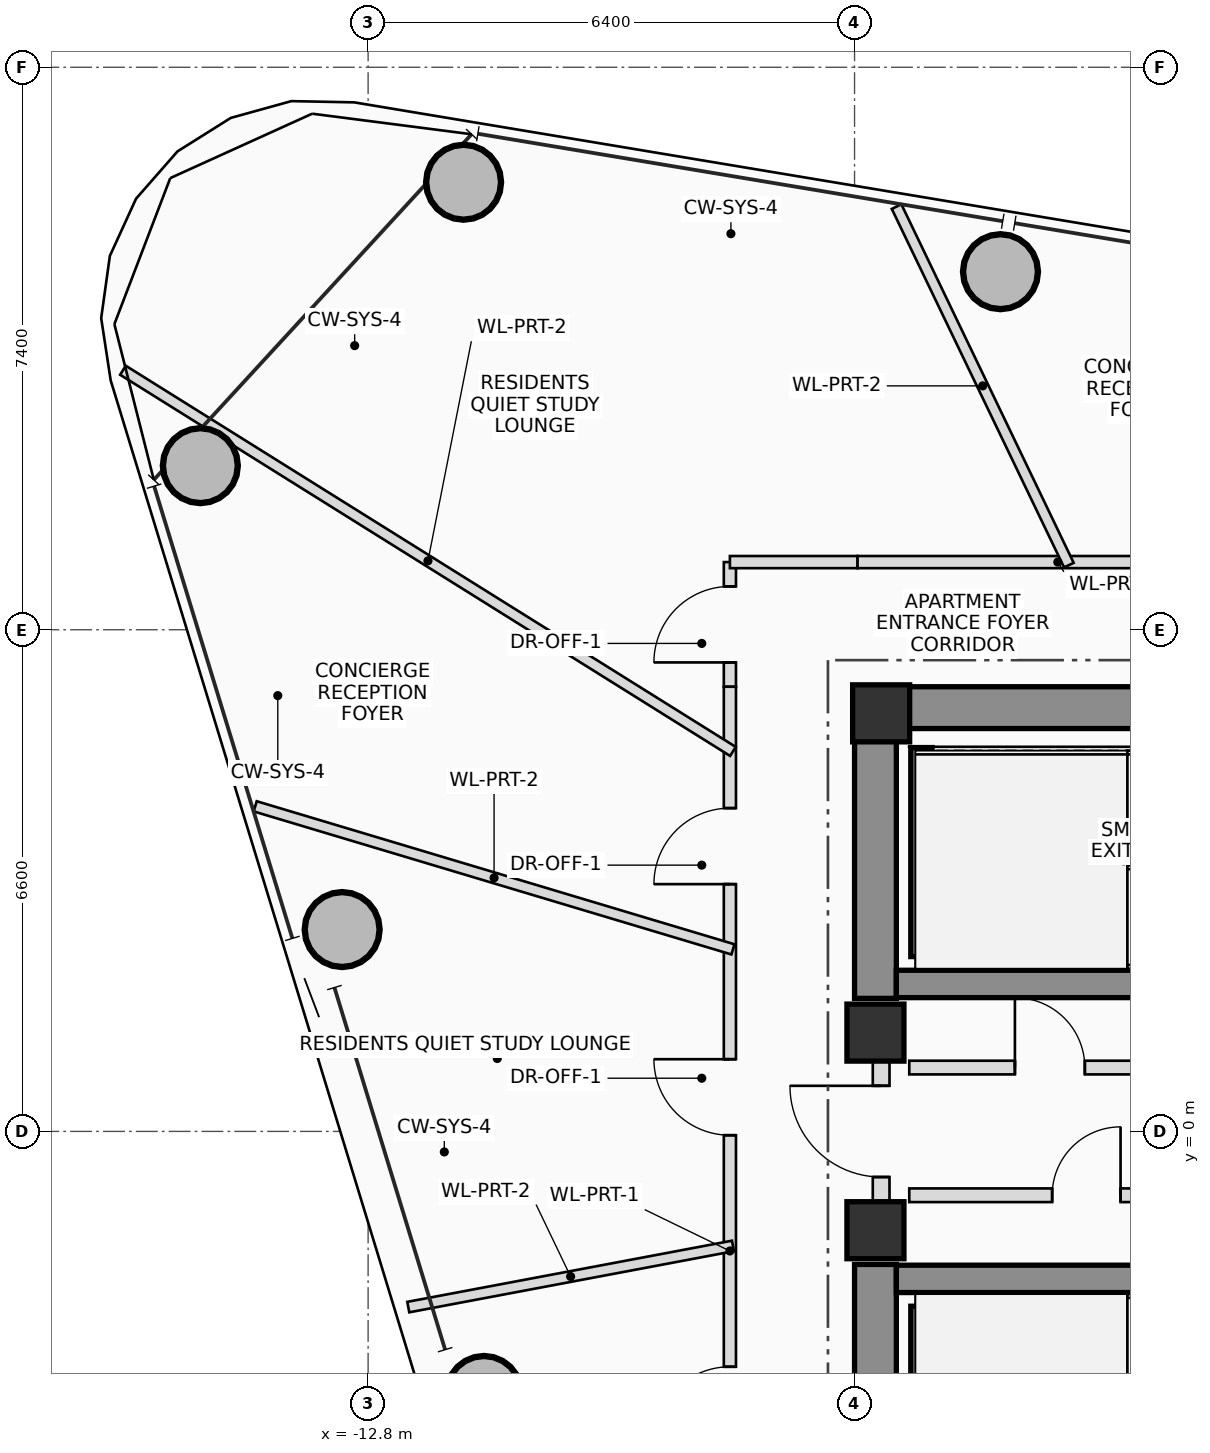
"""IFC4 building model, lengths in metres.
Left out: names, types, materials, properties, quantities, classifications, styles, units other than length and angle.
Written with IfcOpenShell. Run it as: python <this file> out.ifc"""

import sys

from ifc_helpers import new_model, si_unit, direction, frame, frame_2d, origin, origin_2d, place, context, subcontext, project, spatial, rectangle, hollow_circle, extrude, source, transform, mapped, element, fill, save


model = new_model("IFC4")
c1 = context("Model", 3, precision=1e-05, world=origin(), true_north=direction((0.0, 1.0)))
c2 = subcontext(c1, "Body", "Model", "MODEL_VIEW")
j1 = project(units=[si_unit("LENGTHUNIT", "METRE"), si_unit("PLANEANGLEUNIT", "RADIAN")], contexts=[c1])
p1 = place(None, origin())
s1 = spatial("IfcSite", under=j1, at=p1, CompositionType="ELEMENT")
p2 = place(p1, origin())
s2 = spatial("IfcBuilding", under=s1, at=p2, CompositionType="ELEMENT")
p3 = place(p2, frame((0.0, 0.0, 245.65)))
s3 = spatial("IfcBuildingStorey", under=s2, at=p3, CompositionType="ELEMENT", Elevation=245.65)
m1 = source(origin(), c2, "Body", "SweptSolid", [
    extrude(rectangle(XDim=0.75, YDim=0.75, at=origin_2d()), origin(), (0.0, 0.0, 1.0), 3.4),
])
p4 = place(p3, frame((-6.05, 5.5, 0.0), z_axis=(0.0, 0.0, 1.0), x_axis=(1.0, 0.0, 0.0)))
e1 = element("IfcColumn", 1, at=p4, inside=s3, PredefinedType="COLUMN", context=c2, shape_type="MappedRepresentation", body=[
    mapped(m1, transform((0.0, 0.0, 0.0), scale=1.0)),
])
p5 = place(p3, frame((-6.4, 5.575, 0.0), z_axis=(0.0, 0.0, 1.0), x_axis=(1.0, 0.0, 0.0)))
e2 = element("IfcWall", 2, at=p5, inside=s3, PredefinedType="SHEAR", context=c2, shape_type="SweptSolid", body=[
    extrude(rectangle(XDim=12.8, YDim=0.55, at=frame_2d((6.4, 0.0))), origin(), (0.0, 0.0, 1.0), 3.4),
])
p6 = place(p5, frame((8.6, 0.0, 0.0)))
e3 = element("IfcOpeningElement", 3, at=p6, cuts=e2, PredefinedType="OPENING", context=c2, shape_type="SweptSolid", body=[
    extrude(rectangle(XDim=1.2, YDim=2.2, at=frame_2d((0.6, 1.1))), frame((0.0, 0.285, 0.0), z_axis=(0.0, -1.0, 0.0), x_axis=(1.0, 0.0, 0.0)), (0.0, 0.0, 1.0), 0.57),
])
for number, where, z_axis, x_axis in (
    (4, (-6.125, -5.3, 0.0), (0.0, 0.0, 1.0), (0.0, 1.0, 0.0)),
    (5, (-6.125, 1.75, 0.0), (0.0, 0.0, 1.0), (0.0, 1.0, 0.0)),
):
    element("IfcWall", number, at=place(p3, frame(where, z_axis=z_axis, x_axis=x_axis)), inside=s3, PredefinedType="SHEAR", context=c2, shape_type="SweptSolid", body=[
        extrude(rectangle(XDim=3.55, YDim=0.55, at=frame_2d((1.775, 0.0))), origin(), (0.0, 0.0, 1.0), 3.4),
    ])
for number, where, z_axis, x_axis in (
    (6, (-5.85, 1.94, 0.0), (0.0, 0.0, 1.0), (1.0, 0.0, 0.0)),
    (7, (-5.85, -1.94, 0.0), (0.0, 0.0, 1.0), (1.0, 0.0, 0.0)),
):
    element("IfcWall", number, at=place(p3, frame(where, z_axis=z_axis, x_axis=x_axis)), inside=s3, PredefinedType="SHEAR", context=c2, shape_type="SweptSolid", body=[
        extrude(rectangle(XDim=11.7, YDim=0.36, at=frame_2d((5.85, 0.0))), origin(), (0.0, 0.0, 1.0), 3.4),
    ])
for number, where, z_axis, x_axis in (
    (8, (-5.52, 2.3, 0.0), (0.0, 0.0, 1.0), (0.0, 1.0, 0.0)),
    (9, (-5.52, -5.05, 0.0), (0.0, 0.0, 1.0), (0.0, 1.0, 0.0)),
):
    element("IfcWall", number, at=place(p3, frame(where, z_axis=z_axis, x_axis=x_axis)), inside=s3, PredefinedType="SHEAR", context=c2, shape_type="SweptSolid", body=[
        extrude(rectangle(XDim=2.75, YDim=0.28, at=frame_2d((1.375, 0.0))), origin(), (0.0, 0.0, 1.0), 3.4),
    ])
for number, where, z_axis, x_axis in (
    (10, (-6.125, -1.3, 0.0), (0.0, 0.0, 1.0), (1.0, 0.0, 0.0)),
    (11, (-6.125, 1.3, 0.0), (0.0, 0.0, 1.0), (1.0, 0.0, 0.0)),
):
    element("IfcColumn", number, at=place(p3, frame(where, z_axis=z_axis, x_axis=x_axis)), inside=s3, PredefinedType="COLUMN", context=c2, shape_type="MappedRepresentation", body=[
        mapped(m1, transform((0.0, 0.0, 0.0), scale=1.0)),
    ])
m2 = source(origin(), c2, "Body", "SweptSolid", [
    extrude(hollow_circle(Radius=0.5, WallThickness=0.04, at=origin_2d()), origin(), (0.0, 0.0, 1.0), 3.4),
])
for number, where, z_axis, x_axis in (
    (12, (-4.48, 11.311, 0.0), (0.0, 0.0, 1.0), (1.0, 0.0, 0.0)),
    (13, (-11.544, 12.488, 0.0), (0.0, 0.0, 1.0), (1.0, 0.0, 0.0)),
    (14, (-15.008, 8.759, 0.0), (0.0, 0.0, 1.0), (1.0, 0.0, 0.0)),
    (15, (-13.142, 2.656, 0.0), (0.0, 0.0, 1.0), (1.0, 0.0, 0.0)),
    (16, (-11.276, -3.448, 0.0), (0.0, 0.0, 1.0), (1.0, 0.0, 0.0)),
):
    element("IfcColumn", number, at=place(p3, frame(where, z_axis=z_axis, x_axis=x_axis)), inside=s3, PredefinedType="COLUMN", context=c2, shape_type="MappedRepresentation", body=[
        mapped(m2, transform((0.0, 0.0, 0.0), scale=1.0)),
    ])
p7 = place(p3, frame((-6.05, -0.95, 0.0), z_axis=(0.0, 0.0, 1.0), x_axis=(0.0, 1.0, 0.0)))
e17 = element("IfcWall", 17, at=p7, inside=s3, PredefinedType="PLUMBINGWALL", context=c2, shape_type="SweptSolid", body=[
    extrude(rectangle(XDim=1.9, YDim=0.22, at=frame_2d((0.95, 0.0))), origin(), (0.0, 0.0, 1.0), 2.18),
])
p8 = place(p7, frame((0.35, 0.0, 0.0)))
e18 = element("IfcOpeningElement", 18, at=p8, cuts=e17, PredefinedType="OPENING", context=c2, shape_type="SweptSolid", body=[
    extrude(rectangle(XDim=1.2, YDim=2.2, at=frame_2d((0.6, 1.1))), frame((0.0, 0.12, 0.0), z_axis=(0.0, -1.0, 0.0), x_axis=(1.0, 0.0, 0.0)), (0.0, 0.0, 1.0), 0.24),
])
p9 = place(p3, frame((-5.68, 0.84, 0.0), z_axis=(0.0, 0.0, 1.0), x_axis=(1.0, 0.0, 0.0)))
e19 = element("IfcWall", 19, at=p9, inside=s3, PredefinedType="PLUMBINGWALL", context=c2, shape_type="SweptSolid", body=[
    extrude(rectangle(XDim=11.33, YDim=0.18, at=frame_2d((5.665, 0.0))), origin(), (0.0, 0.0, 1.0), 3.2),
])
p10 = place(p9, frame((1.39, 0.0, 0.0)))
e20 = element("IfcOpeningElement", 20, at=p10, cuts=e19, PredefinedType="OPENING", context=c2, shape_type="SweptSolid", body=[
    extrude(rectangle(XDim=0.92, YDim=2.1, at=frame_2d((0.46, 1.05))), frame((0.0, 0.1, 0.0), z_axis=(0.0, -1.0, 0.0), x_axis=(1.0, 0.0, 0.0)), (0.0, 0.0, 1.0), 0.2),
])
p11 = place(p9, frame((4.87, 0.0, 0.0)))
e21 = element("IfcOpeningElement", 21, at=p11, cuts=e19, PredefinedType="OPENING", context=c2, shape_type="SweptSolid", body=[
    extrude(rectangle(XDim=0.9, YDim=2.05, at=frame_2d((0.45, 1.025))), frame((0.0, 0.1, 0.0), z_axis=(0.0, -1.0, 0.0), x_axis=(1.0, 0.0, 0.0)), (0.0, 0.0, 1.0), 0.2),
])
p12 = place(p9, frame((7.33, 0.0, 0.0)))
e22 = element("IfcOpeningElement", 22, at=p12, cuts=e19, PredefinedType="OPENING", context=c2, shape_type="SweptSolid", body=[
    extrude(rectangle(XDim=1.1, YDim=2.2, at=frame_2d((0.55, 1.1))), frame((0.0, 0.1, 0.0), z_axis=(0.0, -1.0, 0.0), x_axis=(1.0, 0.0, 0.0)), (0.0, 0.0, 1.0), 0.2),
])
p13 = place(p9, frame((8.83, 0.0, 0.0)))
e23 = element("IfcOpeningElement", 23, at=p13, cuts=e19, PredefinedType="OPENING", context=c2, shape_type="SweptSolid", body=[
    extrude(rectangle(XDim=1.1, YDim=2.2, at=frame_2d((0.55, 1.1))), frame((0.0, 0.1, 0.0), z_axis=(0.0, -1.0, 0.0), x_axis=(1.0, 0.0, 0.0)), (0.0, 0.0, 1.0), 0.2),
])
p14 = place(p9, frame((10.25, 0.0, 0.0)))
e24 = element("IfcOpeningElement", 24, at=p14, cuts=e19, PredefinedType="OPENING", context=c2, shape_type="SweptSolid", body=[
    extrude(rectangle(XDim=0.9, YDim=2.05, at=frame_2d((0.45, 1.025))), frame((0.0, 0.1, 0.0), z_axis=(0.0, -1.0, 0.0), x_axis=(1.0, 0.0, 0.0)), (0.0, 0.0, 1.0), 0.2),
])
p15 = place(p3, frame((-5.68, -0.84, 0.0), z_axis=(0.0, 0.0, 1.0), x_axis=(1.0, 0.0, 0.0)))
e25 = element("IfcWall", 25, at=p15, inside=s3, PredefinedType="PLUMBINGWALL", context=c2, shape_type="SweptSolid", body=[
    extrude(rectangle(XDim=11.33, YDim=0.18, at=frame_2d((5.665, 0.0))), origin(), (0.0, 0.0, 1.0), 3.2),
])
p16 = place(p15, frame((1.88, 0.0, 0.0)))
e26 = element("IfcOpeningElement", 26, at=p16, cuts=e25, PredefinedType="OPENING", context=c2, shape_type="SweptSolid", body=[
    extrude(rectangle(XDim=0.9, YDim=2.05, at=frame_2d((0.45, 1.025))), frame((0.0, 0.1, 0.0), z_axis=(0.0, -1.0, 0.0), x_axis=(1.0, 0.0, 0.0)), (0.0, 0.0, 1.0), 0.2),
])
p17 = place(p15, frame((5.35, 0.0, 0.0)))
e27 = element("IfcOpeningElement", 27, at=p17, cuts=e25, PredefinedType="OPENING", context=c2, shape_type="SweptSolid", body=[
    extrude(rectangle(XDim=0.9, YDim=2.05, at=frame_2d((0.45, 1.025))), frame((0.0, 0.1, 0.0), z_axis=(0.0, -1.0, 0.0), x_axis=(1.0, 0.0, 0.0)), (0.0, 0.0, 1.0), 0.2),
])
p18 = place(p15, frame((7.33, 0.0, 0.0)))
e28 = element("IfcOpeningElement", 28, at=p18, cuts=e25, PredefinedType="OPENING", context=c2, shape_type="SweptSolid", body=[
    extrude(rectangle(XDim=1.1, YDim=2.2, at=frame_2d((0.55, 1.1))), frame((0.0, 0.1, 0.0), z_axis=(0.0, -1.0, 0.0), x_axis=(1.0, 0.0, 0.0)), (0.0, 0.0, 1.0), 0.2),
])
p19 = place(p15, frame((8.9, 0.0, 0.0)))
e29 = element("IfcOpeningElement", 29, at=p19, cuts=e25, PredefinedType="OPENING", context=c2, shape_type="SweptSolid", body=[
    extrude(rectangle(XDim=0.9, YDim=2.05, at=frame_2d((0.45, 1.025))), frame((0.0, 0.1, 0.0), z_axis=(0.0, -1.0, 0.0), x_axis=(1.0, 0.0, 0.0)), (0.0, 0.0, 1.0), 0.2),
])
p20 = place(p15, frame((10.25, 0.0, 0.0)))
e30 = element("IfcOpeningElement", 30, at=p20, cuts=e25, PredefinedType="OPENING", context=c2, shape_type="SweptSolid", body=[
    extrude(rectangle(XDim=0.9, YDim=2.05, at=frame_2d((0.45, 1.025))), frame((0.0, 0.1, 0.0), z_axis=(0.0, -1.0, 0.0), x_axis=(1.0, 0.0, 0.0)), (0.0, 0.0, 1.0), 0.2),
])
p21 = place(p3, frame((-8.04, 5.85, 0.0), z_axis=(0.0, 0.0, 1.0), x_axis=(0.0, 1.0, 0.0)))
e31 = element("IfcWall", 31, at=p21, inside=s3, PredefinedType="PARTITIONING", context=c2, shape_type="SweptSolid", body=[
    extrude(rectangle(XDim=1.64, YDim=0.16, at=frame_2d((0.82, 0.0))), origin(), (0.0, 0.0, 1.0), 2.605),
])
p22 = place(p21, frame((0.32, 0.0, 0.0)))
e32 = element("IfcOpeningElement", 32, at=p22, cuts=e31, PredefinedType="OPENING", context=c2, shape_type="SweptSolid", body=[
    extrude(rectangle(XDim=1.0, YDim=2.25, at=frame_2d((0.5, 1.125))), frame((0.0, 0.09, 0.0), z_axis=(0.0, -1.0, 0.0), x_axis=(1.0, 0.0, 0.0)), (0.0, 0.0, 1.0), 0.18),
])
p23 = place(p3, frame((-8.04, 7.49, 0.0), z_axis=(0.0, 0.0, 1.0), x_axis=(1.0, 0.0, 0.0)))
e33 = element("IfcWall", 33, at=p23, inside=s3, PredefinedType="PARTITIONING", context=c2, shape_type="SweptSolid", body=[
    extrude(rectangle(XDim=1.68, YDim=0.16, at=frame_2d((0.84, 0.0))), origin(), (0.0, 0.0, 1.0), 2.605),
])
p24 = place(p3, frame((-6.36, 7.49, 0.0), z_axis=(0.0, 0.0, 1.0), x_axis=(1.0, 0.0, 0.0)))
e34 = element("IfcWall", 34, at=p24, inside=s3, PredefinedType="PARTITIONING", context=c2, shape_type="SweptSolid", body=[
    extrude(rectangle(XDim=9.81, YDim=0.16, at=frame_2d((4.905, 0.0))), origin(), (0.0, 0.0, 1.0), 2.605),
])
p25 = place(p24, frame((5.419, 0.0, 0.0)))
e35 = element("IfcOpeningElement", 35, at=p25, cuts=e34, PredefinedType="OPENING", context=c2, shape_type="SweptSolid", body=[
    extrude(rectangle(XDim=1.0, YDim=2.25, at=frame_2d((0.5, 1.125))), frame((0.0, 0.09, 0.0), z_axis=(0.0, -1.0, 0.0), x_axis=(1.0, 0.0, 0.0)), (0.0, 0.0, 1.0), 0.18),
])
p26 = place(p3, frame((-8.04, -5.85, 0.0), z_axis=(0.0, 0.0, 1.0), x_axis=(0.0, 1.0, 0.0)))
e36 = element("IfcWall", 36, at=p26, inside=s3, PredefinedType="PARTITIONING", context=c2, shape_type="SweptSolid", body=[
    extrude(rectangle(XDim=11.7, YDim=0.16, at=frame_2d((5.85, 0.0))), origin(), (0.0, 0.0, 1.0), 2.605),
])
p27 = place(p26, frame((1.754, 0.0, 0.0)))
e37 = element("IfcOpeningElement", 37, at=p27, cuts=e36, PredefinedType="OPENING", context=c2, shape_type="SweptSolid", body=[
    extrude(rectangle(XDim=1.0, YDim=2.25, at=frame_2d((0.5, 1.125))), frame((0.0, 0.09, 0.0), z_axis=(0.0, -1.0, 0.0), x_axis=(1.0, 0.0, 0.0)), (0.0, 0.0, 1.0), 0.18),
])
p28 = place(p26, frame((5.8, 0.0, 0.0)))
e38 = element("IfcOpeningElement", 38, at=p28, cuts=e36, PredefinedType="OPENING", context=c2, shape_type="SweptSolid", body=[
    extrude(rectangle(XDim=1.0, YDim=2.25, at=frame_2d((0.5, 1.125))), frame((0.0, 0.09, 0.0), z_axis=(0.0, -1.0, 0.0), x_axis=(1.0, 0.0, 0.0)), (0.0, 0.0, 1.0), 0.18),
])
p29 = place(p26, frame((9.103, 0.0, 0.0)))
e39 = element("IfcOpeningElement", 39, at=p29, cuts=e36, PredefinedType="OPENING", context=c2, shape_type="SweptSolid", body=[
    extrude(rectangle(XDim=1.0, YDim=2.25, at=frame_2d((0.5, 1.125))), frame((0.0, 0.09, 0.0), z_axis=(0.0, -1.0, 0.0), x_axis=(1.0, 0.0, 0.0)), (0.0, 0.0, 1.0), 0.18),
])
p30 = place(p3, frame((-3.58, 7.45, 0.0), z_axis=(0.0, 0.0, 1.0), x_axis=(-0.433107149182, 0.901342441765, 0.0)))
e40 = element("IfcWall", 40, at=p30, inside=s3, PredefinedType="PARTITIONING", context=c2, shape_type="SweptSolid", body=[
    extrude(rectangle(XDim=5.233, YDim=0.14, at=frame_2d((2.617, 0.0))), origin(), (0.0, 0.0, 1.0), 2.605),
])
p31 = place(p3, frame((-8.0, 4.999, 0.0), z_axis=(0.0, 0.0, 1.0), x_axis=(-0.848044679887, 0.529924731369, 0.0)))
e41 = element("IfcWall", 41, at=p31, inside=s3, PredefinedType="PARTITIONING", context=c2, shape_type="SweptSolid", body=[
    extrude(rectangle(XDim=9.463, YDim=0.14, at=frame_2d((4.732, 0.0))), origin(), (0.0, 0.0, 1.0), 2.605),
])
p32 = place(p3, frame((-8.0, 2.395, 0.0), z_axis=(0.0, 0.0, 1.0), x_axis=(-0.957987942155, 0.286808477361, 0.0)))
e42 = element("IfcWall", 42, at=p32, inside=s3, PredefinedType="PARTITIONING", context=c2, shape_type="SweptSolid", body=[
    extrude(rectangle(XDim=6.561, YDim=0.14, at=frame_2d((3.281, 0.0))), origin(), (0.0, 0.0, 1.0), 2.605),
])
p33 = place(p3, frame((-8.0, -1.507, 0.0), z_axis=(0.0, 0.0, 1.0), x_axis=(-0.982724350189, -0.185075259138, 0.0)))
e43 = element("IfcWall", 43, at=p33, inside=s3, PredefinedType="PARTITIONING", context=c2, shape_type="SweptSolid", body=[
    extrude(rectangle(XDim=4.347, YDim=0.14, at=frame_2d((2.173, 0.0))), origin(), (0.0, 0.0, 1.0), 2.765),
])
p34 = place(p8, origin())
e44 = element("IfcDoor", 44, at=p34, inside=s3, OperationType="SINGLE_SWING_RIGHT", PredefinedType="DOOR", context=c2, shape_type="SweptSolid", body=[
    extrude(rectangle(XDim=1.2, YDim=2.2, at=frame_2d((0.6, 1.1))), frame((0.0, 0.025, 0.0), z_axis=(0.0, -1.0, 0.0), x_axis=(1.0, 0.0, 0.0)), (0.0, 0.0, 1.0), 0.05),
])
fill(e18, e44)
p35 = place(p10, origin())
e45 = element("IfcDoor", 45, at=p35, inside=s3, OperationType="SINGLE_SWING_LEFT", PredefinedType="DOOR", context=c2, shape_type="SweptSolid", body=[
    extrude(rectangle(XDim=0.92, YDim=2.1, at=frame_2d((0.46, 1.05))), frame((0.0, 0.025, 0.0), z_axis=(0.0, -1.0, 0.0), x_axis=(1.0, 0.0, 0.0)), (0.0, 0.0, 1.0), 0.05),
])
fill(e20, e45)
p36 = place(p16, origin())
e46 = element("IfcDoor", 46, at=p36, inside=s3, OperationType="SINGLE_SWING_RIGHT", PredefinedType="DOOR", context=c2, shape_type="SweptSolid", body=[
    extrude(rectangle(XDim=0.9, YDim=2.05, at=frame_2d((0.45, 1.025))), frame((0.0, 0.025, 0.0), z_axis=(0.0, -1.0, 0.0), x_axis=(1.0, 0.0, 0.0)), (0.0, 0.0, 1.0), 0.05),
])
fill(e26, e46)
p37 = place(p22, origin())
e47 = element("IfcDoor", 47, at=p37, inside=s3, OperationType="SINGLE_SWING_LEFT", PredefinedType="DOOR", context=c2, shape_type="SweptSolid", body=[
    extrude(rectangle(XDim=1.0, YDim=2.25, at=frame_2d((0.5, 1.125))), frame((0.0, 0.025, 0.0), z_axis=(0.0, -1.0, 0.0), x_axis=(1.0, 0.0, 0.0)), (0.0, 0.0, 1.0), 0.05),
])
fill(e32, e47)
p38 = place(p27, origin())
e48 = element("IfcDoor", 48, at=p38, inside=s3, OperationType="SINGLE_SWING_LEFT", PredefinedType="DOOR", context=c2, shape_type="SweptSolid", body=[
    extrude(rectangle(XDim=1.0, YDim=2.25, at=frame_2d((0.5, 1.125))), frame((0.0, 0.025, 0.0), z_axis=(0.0, -1.0, 0.0), x_axis=(1.0, 0.0, 0.0)), (0.0, 0.0, 1.0), 0.05),
])
fill(e37, e48)
p39 = place(p28, origin())
e49 = element("IfcDoor", 49, at=p39, inside=s3, OperationType="SINGLE_SWING_RIGHT", PredefinedType="DOOR", context=c2, shape_type="SweptSolid", body=[
    extrude(rectangle(XDim=1.0, YDim=2.25, at=frame_2d((0.5, 1.125))), frame((0.0, 0.025, 0.0), z_axis=(0.0, -1.0, 0.0), x_axis=(1.0, 0.0, 0.0)), (0.0, 0.0, 1.0), 0.05),
])
fill(e38, e49)
p40 = place(p29, origin())
e50 = element("IfcDoor", 50, at=p40, inside=s3, OperationType="SINGLE_SWING_LEFT", PredefinedType="DOOR", context=c2, shape_type="SweptSolid", body=[
    extrude(rectangle(XDim=1.0, YDim=2.25, at=frame_2d((0.5, 1.125))), frame((0.0, 0.025, 0.0), z_axis=(0.0, -1.0, 0.0), x_axis=(1.0, 0.0, 0.0)), (0.0, 0.0, 1.0), 0.05),
])
fill(e39, e50)
save(model, sys.argv[1])
